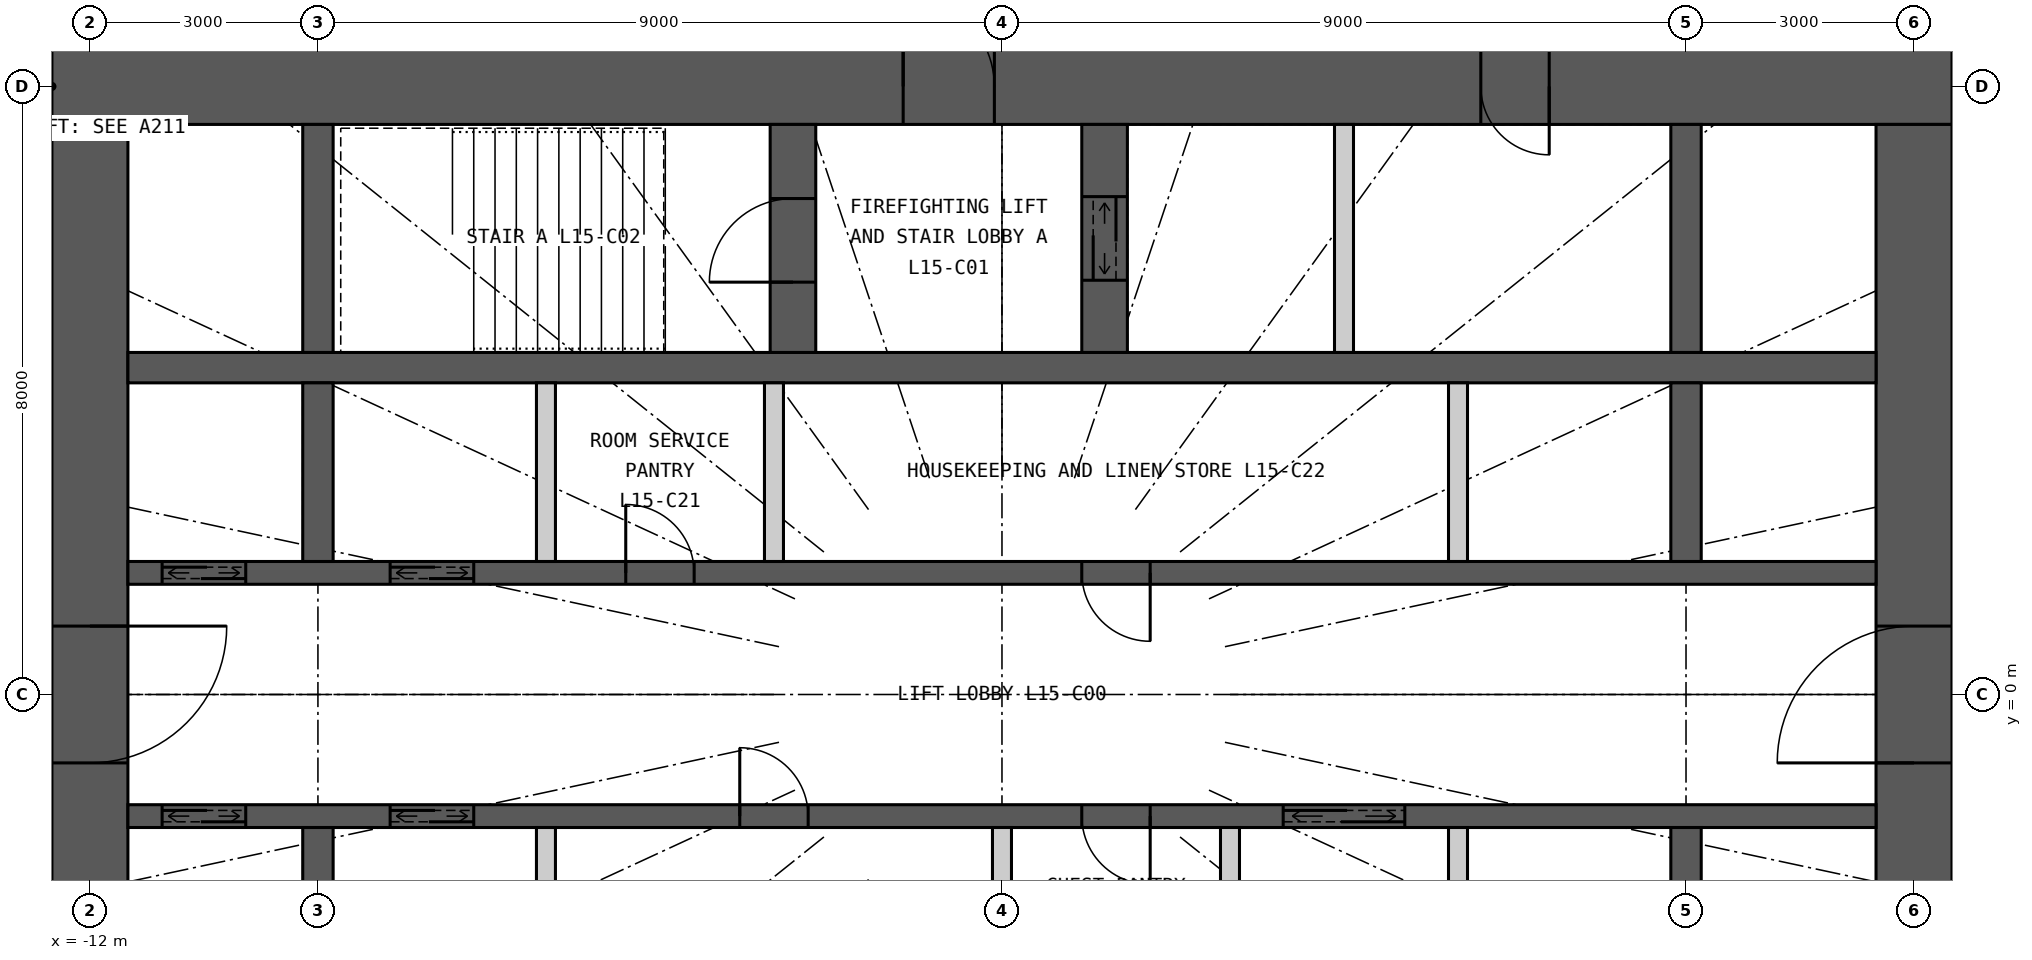
"""IFC4 building model, lengths in metres.
Left out: names, types, materials, properties, quantities, classifications, styles, units other than length and angle.
Written with IfcOpenShell. Run it as: python <this file> out.ifc"""

import sys

from ifc_helpers import new_model, si_unit, direction, frame, frame_2d, origin, place, context, subcontext, project, spatial, rectangle, extrude, element, fill, save


model = new_model("IFC4")
c1 = context("Model", 3, precision=1e-05, world=origin(), true_north=direction((0.0, 1.0)))
c2 = subcontext(c1, "Body", "Model", "MODEL_VIEW")
j1 = project(units=[si_unit("LENGTHUNIT", "METRE"), si_unit("PLANEANGLEUNIT", "RADIAN")], contexts=[c1])
p1 = place(None, origin())
s1 = spatial("IfcSite", under=j1, at=p1, CompositionType="ELEMENT")
p2 = place(p1, origin())
s2 = spatial("IfcBuilding", under=s1, at=p2, CompositionType="ELEMENT")
p3 = place(p2, frame((0.0, 0.0, 63.9)))
s3 = spatial("IfcBuildingStorey", under=s2, at=p3, CompositionType="ELEMENT", Elevation=63.9)
p4 = place(p3, frame((-12.5, 8.0, 0.0), z_axis=(0.0, 0.0, 1.0), x_axis=(1.0, 0.0, 0.0)))
e1 = element("IfcWall", 1, at=p4, inside=s3, PredefinedType="SHEAR", context=c2, shape_type="SweptSolid", body=[
    extrude(rectangle(XDim=25.0, YDim=1.0, at=frame_2d((12.5, 0.0))), origin(), (0.0, 0.0, 1.0), 3.3),
])
p5 = place(p4, frame((11.2, 0.0, 0.0)))
e2 = element("IfcOpeningElement", 2, at=p5, cuts=e1, PredefinedType="OPENING", context=c2, shape_type="SweptSolid", body=[
    extrude(rectangle(XDim=1.2, YDim=2.2, at=frame_2d((0.6, 1.1))), frame((0.0, 0.51, 0.0), z_axis=(0.0, -1.0, 0.0), x_axis=(1.0, 0.0, 0.0)), (0.0, 0.0, 1.0), 1.02),
])
p6 = place(p4, frame((18.8, 0.0, 0.0)))
e3 = element("IfcOpeningElement", 3, at=p6, cuts=e1, PredefinedType="OPENING", context=c2, shape_type="SweptSolid", body=[
    extrude(rectangle(XDim=0.9, YDim=2.2, at=frame_2d((0.45, 1.1))), frame((0.0, 0.51, 0.0), z_axis=(0.0, -1.0, 0.0), x_axis=(1.0, 0.0, 0.0)), (0.0, 0.0, 1.0), 1.02),
])
p7 = place(p3, frame((12.0, -7.5, 0.0), z_axis=(0.0, 0.0, 1.0), x_axis=(0.0, 1.0, 0.0)))
e4 = element("IfcWall", 4, at=p7, inside=s3, PredefinedType="SHEAR", context=c2, shape_type="SweptSolid", body=[
    extrude(rectangle(XDim=15.0, YDim=1.0, at=frame_2d((7.5, 0.0))), origin(), (0.0, 0.0, 1.0), 3.3),
])
p8 = place(p7, frame((6.6, 0.0, 0.0)))
e5 = element("IfcOpeningElement", 5, at=p8, cuts=e4, PredefinedType="OPENING", context=c2, shape_type="SweptSolid", body=[
    extrude(rectangle(XDim=1.8, YDim=2.2, at=frame_2d((0.9, 1.1))), frame((0.0, 0.51, 0.0), z_axis=(0.0, -1.0, 0.0), x_axis=(1.0, 0.0, 0.0)), (0.0, 0.0, 1.0), 1.02),
])
p9 = place(p3, frame((-12.0, 7.5, 0.0), z_axis=(0.0, 0.0, 1.0), x_axis=(0.0, -1.0, 0.0)))
e6 = element("IfcWall", 6, at=p9, inside=s3, PredefinedType="SHEAR", context=c2, shape_type="SweptSolid", body=[
    extrude(rectangle(XDim=15.0, YDim=1.0, at=frame_2d((7.5, 0.0))), origin(), (0.0, 0.0, 1.0), 3.3),
])
p10 = place(p9, frame((6.6, 0.0, 0.0)))
e7 = element("IfcOpeningElement", 7, at=p10, cuts=e6, PredefinedType="OPENING", context=c2, shape_type="SweptSolid", body=[
    extrude(rectangle(XDim=1.8, YDim=2.2, at=frame_2d((0.9, 1.1))), frame((0.0, 0.51, 0.0), z_axis=(0.0, -1.0, 0.0), x_axis=(1.0, 0.0, 0.0)), (0.0, 0.0, 1.0), 1.02),
])
p11 = place(p3, frame((-11.5, 4.3, 0.0), z_axis=(0.0, 0.0, 1.0), x_axis=(1.0, 0.0, 0.0)))
e8 = element("IfcWall", 8, at=p11, inside=s3, PredefinedType="SHEAR", context=c2, shape_type="SweptSolid", body=[
    extrude(rectangle(XDim=23.0, YDim=0.4, at=frame_2d((11.5, 0.0))), origin(), (0.0, 0.0, 1.0), 3.3),
])
p12 = place(p3, frame((-11.5, 1.6, 0.0), z_axis=(0.0, 0.0, 1.0), x_axis=(1.0, 0.0, 0.0)))
e9 = element("IfcWall", 9, at=p12, inside=s3, PredefinedType="SHEAR", context=c2, shape_type="SweptSolid", body=[
    extrude(rectangle(XDim=23.0, YDim=0.3, at=frame_2d((11.5, 0.0))), origin(), (0.0, 0.0, 1.0), 3.3),
])
p13 = place(p12, frame((0.45, 0.0, 0.0)))
e10 = element("IfcOpeningElement", 10, at=p13, cuts=e9, PredefinedType="OPENING", context=c2, shape_type="SweptSolid", body=[
    extrude(rectangle(XDim=1.1, YDim=2.2, at=frame_2d((0.55, 1.1))), frame((0.0, 0.16, 0.0), z_axis=(0.0, -1.0, 0.0), x_axis=(1.0, 0.0, 0.0)), (0.0, 0.0, 1.0), 0.32),
])
p14 = place(p12, frame((3.45, 0.0, 0.0)))
e11 = element("IfcOpeningElement", 11, at=p14, cuts=e9, PredefinedType="OPENING", context=c2, shape_type="SweptSolid", body=[
    extrude(rectangle(XDim=1.1, YDim=2.2, at=frame_2d((0.55, 1.1))), frame((0.0, 0.16, 0.0), z_axis=(0.0, -1.0, 0.0), x_axis=(1.0, 0.0, 0.0)), (0.0, 0.0, 1.0), 0.32),
])
p15 = place(p12, frame((6.55, 0.0, 0.0)))
e12 = element("IfcOpeningElement", 12, at=p15, cuts=e9, PredefinedType="OPENING", context=c2, shape_type="SweptSolid", body=[
    extrude(rectangle(XDim=0.9, YDim=2.2, at=frame_2d((0.45, 1.1))), frame((0.0, 0.16, 0.0), z_axis=(0.0, -1.0, 0.0), x_axis=(1.0, 0.0, 0.0)), (0.0, 0.0, 1.0), 0.32),
])
p16 = place(p12, frame((12.55, 0.0, 0.0)))
e13 = element("IfcOpeningElement", 13, at=p16, cuts=e9, PredefinedType="OPENING", context=c2, shape_type="SweptSolid", body=[
    extrude(rectangle(XDim=0.9, YDim=2.2, at=frame_2d((0.45, 1.1))), frame((0.0, 0.16, 0.0), z_axis=(0.0, -1.0, 0.0), x_axis=(1.0, 0.0, 0.0)), (0.0, 0.0, 1.0), 0.32),
])
p17 = place(p3, frame((-11.5, -1.6, 0.0), z_axis=(0.0, 0.0, 1.0), x_axis=(1.0, 0.0, 0.0)))
e14 = element("IfcWall", 14, at=p17, inside=s3, PredefinedType="SHEAR", context=c2, shape_type="SweptSolid", body=[
    extrude(rectangle(XDim=23.0, YDim=0.3, at=frame_2d((11.5, 0.0))), origin(), (0.0, 0.0, 1.0), 3.3),
])
p18 = place(p17, frame((0.45, 0.0, 0.0)))
e15 = element("IfcOpeningElement", 15, at=p18, cuts=e14, PredefinedType="OPENING", context=c2, shape_type="SweptSolid", body=[
    extrude(rectangle(XDim=1.1, YDim=2.2, at=frame_2d((0.55, 1.1))), frame((0.0, 0.16, 0.0), z_axis=(0.0, -1.0, 0.0), x_axis=(1.0, 0.0, 0.0)), (0.0, 0.0, 1.0), 0.32),
])
p19 = place(p17, frame((3.45, 0.0, 0.0)))
e16 = element("IfcOpeningElement", 16, at=p19, cuts=e14, PredefinedType="OPENING", context=c2, shape_type="SweptSolid", body=[
    extrude(rectangle(XDim=1.1, YDim=2.2, at=frame_2d((0.55, 1.1))), frame((0.0, 0.16, 0.0), z_axis=(0.0, -1.0, 0.0), x_axis=(1.0, 0.0, 0.0)), (0.0, 0.0, 1.0), 0.32),
])
p20 = place(p17, frame((15.2, 0.0, 0.0)))
e17 = element("IfcOpeningElement", 17, at=p20, cuts=e14, PredefinedType="OPENING", context=c2, shape_type="SweptSolid", body=[
    extrude(rectangle(XDim=1.6, YDim=2.4, at=frame_2d((0.8, 1.2))), frame((0.0, 0.16, 0.0), z_axis=(0.0, -1.0, 0.0), x_axis=(1.0, 0.0, 0.0)), (0.0, 0.0, 1.0), 0.32),
])
p21 = place(p17, frame((8.05, 0.0, 0.0)))
e18 = element("IfcOpeningElement", 18, at=p21, cuts=e14, PredefinedType="OPENING", context=c2, shape_type="SweptSolid", body=[
    extrude(rectangle(XDim=0.9, YDim=2.2, at=frame_2d((0.45, 1.1))), frame((0.0, 0.16, 0.0), z_axis=(0.0, -1.0, 0.0), x_axis=(1.0, 0.0, 0.0)), (0.0, 0.0, 1.0), 0.32),
])
p22 = place(p17, frame((12.55, 0.0, 0.0)))
e19 = element("IfcOpeningElement", 19, at=p22, cuts=e14, PredefinedType="OPENING", context=c2, shape_type="SweptSolid", body=[
    extrude(rectangle(XDim=0.9, YDim=2.2, at=frame_2d((0.45, 1.1))), frame((0.0, 0.16, 0.0), z_axis=(0.0, -1.0, 0.0), x_axis=(1.0, 0.0, 0.0)), (0.0, 0.0, 1.0), 0.32),
])
p23 = place(p3, frame((-9.0, 4.5, 0.0), z_axis=(0.0, 0.0, 1.0), x_axis=(0.0, 1.0, 0.0)))
e20 = element("IfcWall", 20, at=p23, inside=s3, PredefinedType="SHEAR", context=c2, shape_type="SweptSolid", body=[
    extrude(rectangle(XDim=3.0, YDim=0.4, at=frame_2d((1.5, 0.0))), origin(), (0.0, 0.0, 1.0), 3.3),
])
for number, where, z_axis, x_axis in (
    (21, (-9.0, 1.75, 0.0), (0.0, 0.0, 1.0), (0.0, 1.0, 0.0)),
    (22, (-9.0, -4.1, 0.0), (0.0, 0.0, 1.0), (0.0, 1.0, 0.0)),
):
    element("IfcWall", number, at=place(p3, frame(where, z_axis=z_axis, x_axis=x_axis)), inside=s3, PredefinedType="SHEAR", context=c2, shape_type="SweptSolid", body=[
        extrude(rectangle(XDim=2.35, YDim=0.4, at=frame_2d((1.175, 0.0))), origin(), (0.0, 0.0, 1.0), 3.3),
    ])
p24 = place(p3, frame((9.0, 4.5, 0.0), z_axis=(0.0, 0.0, 1.0), x_axis=(0.0, 1.0, 0.0)))
e23 = element("IfcWall", 23, at=p24, inside=s3, PredefinedType="SHEAR", context=c2, shape_type="SweptSolid", body=[
    extrude(rectangle(XDim=3.0, YDim=0.4, at=frame_2d((1.5, 0.0))), origin(), (0.0, 0.0, 1.0), 3.3),
])
for number, where, z_axis, x_axis in (
    (24, (9.0, 1.75, 0.0), (0.0, 0.0, 1.0), (0.0, 1.0, 0.0)),
    (25, (9.0, -4.1, 0.0), (0.0, 0.0, 1.0), (0.0, 1.0, 0.0)),
):
    element("IfcWall", number, at=place(p3, frame(where, z_axis=z_axis, x_axis=x_axis)), inside=s3, PredefinedType="SHEAR", context=c2, shape_type="SweptSolid", body=[
        extrude(rectangle(XDim=2.35, YDim=0.4, at=frame_2d((1.175, 0.0))), origin(), (0.0, 0.0, 1.0), 3.3),
    ])
p25 = place(p3, frame((-2.75, 4.5, 0.0), z_axis=(0.0, 0.0, 1.0), x_axis=(0.0, 1.0, 0.0)))
e26 = element("IfcWall", 26, at=p25, inside=s3, PredefinedType="SHEAR", context=c2, shape_type="SweptSolid", body=[
    extrude(rectangle(XDim=3.0, YDim=0.6, at=frame_2d((1.5, 0.0))), origin(), (0.0, 0.0, 1.0), 3.3),
])
p26 = place(p25, frame((0.925, 0.0, 0.0)))
e27 = element("IfcOpeningElement", 27, at=p26, cuts=e26, PredefinedType="OPENING", context=c2, shape_type="SweptSolid", body=[
    extrude(rectangle(XDim=1.1, YDim=2.2, at=frame_2d((0.55, 1.1))), frame((0.0, 0.31, 0.0), z_axis=(0.0, -1.0, 0.0), x_axis=(1.0, 0.0, 0.0)), (0.0, 0.0, 1.0), 0.62),
])
p27 = place(p3, frame((1.35, 4.5, 0.0), z_axis=(0.0, 0.0, 1.0), x_axis=(0.0, 1.0, 0.0)))
e28 = element("IfcWall", 28, at=p27, inside=s3, PredefinedType="SHEAR", context=c2, shape_type="SweptSolid", body=[
    extrude(rectangle(XDim=3.0, YDim=0.6, at=frame_2d((1.5, 0.0))), origin(), (0.0, 0.0, 1.0), 3.3),
])
p28 = place(p27, frame((0.95, 0.0, 0.0)))
e29 = element("IfcOpeningElement", 29, at=p28, cuts=e28, PredefinedType="OPENING", context=c2, shape_type="SweptSolid", body=[
    extrude(rectangle(XDim=1.1, YDim=2.2, at=frame_2d((0.55, 1.1))), frame((0.0, 0.31, 0.0), z_axis=(0.0, -1.0, 0.0), x_axis=(1.0, 0.0, 0.0)), (0.0, 0.0, 1.0), 0.62),
])
p29 = place(p3, frame((4.5, 4.5, 0.0), z_axis=(0.0, 0.0, 1.0), x_axis=(0.0, 1.0, 0.0)))
e30 = element("IfcWall", 30, at=p29, inside=s3, PredefinedType="PARTITIONING", context=c2, shape_type="SweptSolid", body=[
    extrude(rectangle(XDim=3.0, YDim=0.25, at=frame_2d((1.5, 0.0))), origin(), (0.0, 0.0, 1.0), 3.3),
])
for number, where, z_axis, x_axis in (
    (31, (-6.0, 1.75, 0.0), (0.0, 0.0, 1.0), (0.0, 1.0, 0.0)),
    (32, (-3.0, 1.75, 0.0), (0.0, 0.0, 1.0), (0.0, 1.0, 0.0)),
    (33, (6.0, 1.75, 0.0), (0.0, 0.0, 1.0), (0.0, 1.0, 0.0)),
    (34, (-6.0, -4.1, 0.0), (0.0, 0.0, 1.0), (0.0, 1.0, 0.0)),
    (35, (0.0, -4.1, 0.0), (0.0, 0.0, 1.0), (0.0, 1.0, 0.0)),
    (36, (3.0, -4.1, 0.0), (0.0, 0.0, 1.0), (0.0, 1.0, 0.0)),
    (37, (6.0, -4.1, 0.0), (0.0, 0.0, 1.0), (0.0, 1.0, 0.0)),
):
    element("IfcWall", number, at=place(p3, frame(where, z_axis=z_axis, x_axis=x_axis)), inside=s3, PredefinedType="PARTITIONING", context=c2, shape_type="SweptSolid", body=[
        extrude(rectangle(XDim=2.35, YDim=0.25, at=frame_2d((1.175, 0.0))), origin(), (0.0, 0.0, 1.0), 3.3),
    ])
p30 = place(p5, origin())
e38 = element("IfcDoor", 38, at=p30, inside=s3, OperationType="SINGLE_SWING_LEFT", PredefinedType="DOOR", context=c2, shape_type="SweptSolid", body=[
    extrude(rectangle(XDim=1.2, YDim=2.2, at=frame_2d((0.6, 1.1))), frame((0.0, 0.025, 0.0), z_axis=(0.0, -1.0, 0.0), x_axis=(1.0, 0.0, 0.0)), (0.0, 0.0, 1.0), 0.05),
])
fill(e2, e38)
p31 = place(p26, origin())
e39 = element("IfcDoor", 39, at=p31, inside=s3, OperationType="SINGLE_SWING_LEFT", PredefinedType="DOOR", context=c2, shape_type="SweptSolid", body=[
    extrude(rectangle(XDim=1.1, YDim=2.2, at=frame_2d((0.55, 1.1))), frame((0.0, 0.025, 0.0), z_axis=(0.0, -1.0, 0.0), x_axis=(1.0, 0.0, 0.0)), (0.0, 0.0, 1.0), 0.05),
])
fill(e27, e39)
p32 = place(p28, origin())
e40 = element("IfcDoor", 40, at=p32, inside=s3, OperationType="DOUBLE_DOOR_SLIDING", PredefinedType="DOOR", context=c2, shape_type="SweptSolid", body=[
    extrude(rectangle(XDim=1.1, YDim=2.2, at=frame_2d((0.55, 1.1))), frame((0.0, 0.025, 0.0), z_axis=(0.0, -1.0, 0.0), x_axis=(1.0, 0.0, 0.0)), (0.0, 0.0, 1.0), 0.05),
])
fill(e29, e40)
p33 = place(p6, origin())
e41 = element("IfcDoor", 41, at=p33, inside=s3, OperationType="SINGLE_SWING_RIGHT", PredefinedType="DOOR", context=c2, shape_type="SweptSolid", body=[
    extrude(rectangle(XDim=0.9, YDim=2.2, at=frame_2d((0.45, 1.1))), frame((0.0, 0.025, 0.0), z_axis=(0.0, -1.0, 0.0), x_axis=(1.0, 0.0, 0.0)), (0.0, 0.0, 1.0), 0.05),
])
fill(e3, e41)
p34 = place(p13, origin())
e42 = element("IfcDoor", 42, at=p34, inside=s3, OperationType="DOUBLE_DOOR_SLIDING", PredefinedType="DOOR", context=c2, shape_type="SweptSolid", body=[
    extrude(rectangle(XDim=1.1, YDim=2.2, at=frame_2d((0.55, 1.1))), frame((0.0, 0.025, 0.0), z_axis=(0.0, -1.0, 0.0), x_axis=(1.0, 0.0, 0.0)), (0.0, 0.0, 1.0), 0.05),
])
fill(e10, e42)
p35 = place(p14, origin())
e43 = element("IfcDoor", 43, at=p35, inside=s3, OperationType="DOUBLE_DOOR_SLIDING", PredefinedType="DOOR", context=c2, shape_type="SweptSolid", body=[
    extrude(rectangle(XDim=1.1, YDim=2.2, at=frame_2d((0.55, 1.1))), frame((0.0, 0.025, 0.0), z_axis=(0.0, -1.0, 0.0), x_axis=(1.0, 0.0, 0.0)), (0.0, 0.0, 1.0), 0.05),
])
fill(e11, e43)
p36 = place(p18, origin())
e44 = element("IfcDoor", 44, at=p36, inside=s3, OperationType="DOUBLE_DOOR_SLIDING", PredefinedType="DOOR", context=c2, shape_type="SweptSolid", body=[
    extrude(rectangle(XDim=1.1, YDim=2.2, at=frame_2d((0.55, 1.1))), frame((0.0, 0.025, 0.0), z_axis=(0.0, -1.0, 0.0), x_axis=(1.0, 0.0, 0.0)), (0.0, 0.0, 1.0), 0.05),
])
fill(e15, e44)
p37 = place(p19, origin())
e45 = element("IfcDoor", 45, at=p37, inside=s3, OperationType="DOUBLE_DOOR_SLIDING", PredefinedType="DOOR", context=c2, shape_type="SweptSolid", body=[
    extrude(rectangle(XDim=1.1, YDim=2.2, at=frame_2d((0.55, 1.1))), frame((0.0, 0.025, 0.0), z_axis=(0.0, -1.0, 0.0), x_axis=(1.0, 0.0, 0.0)), (0.0, 0.0, 1.0), 0.05),
])
fill(e16, e45)
p38 = place(p20, origin())
e46 = element("IfcDoor", 46, at=p38, inside=s3, OperationType="DOUBLE_DOOR_SLIDING", PredefinedType="DOOR", context=c2, shape_type="SweptSolid", body=[
    extrude(rectangle(XDim=1.6, YDim=2.4, at=frame_2d((0.8, 1.2))), frame((0.0, 0.025, 0.0), z_axis=(0.0, -1.0, 0.0), x_axis=(1.0, 0.0, 0.0)), (0.0, 0.0, 1.0), 0.05),
])
fill(e17, e46)
p39 = place(p15, origin())
e47 = element("IfcDoor", 47, at=p39, inside=s3, OperationType="SINGLE_SWING_LEFT", PredefinedType="DOOR", context=c2, shape_type="SweptSolid", body=[
    extrude(rectangle(XDim=0.9, YDim=2.2, at=frame_2d((0.45, 1.1))), frame((0.0, 0.025, 0.0), z_axis=(0.0, -1.0, 0.0), x_axis=(1.0, 0.0, 0.0)), (0.0, 0.0, 1.0), 0.05),
])
fill(e12, e47)
p40 = place(p16, origin())
e48 = element("IfcDoor", 48, at=p40, inside=s3, OperationType="SINGLE_SWING_RIGHT", PredefinedType="DOOR", context=c2, shape_type="SweptSolid", body=[
    extrude(rectangle(XDim=0.9, YDim=2.2, at=frame_2d((0.45, 1.1))), frame((0.0, 0.025, 0.0), z_axis=(0.0, -1.0, 0.0), x_axis=(1.0, 0.0, 0.0)), (0.0, 0.0, 1.0), 0.05),
])
fill(e13, e48)
p41 = place(p21, origin())
e49 = element("IfcDoor", 49, at=p41, inside=s3, OperationType="SINGLE_SWING_LEFT", PredefinedType="DOOR", context=c2, shape_type="SweptSolid", body=[
    extrude(rectangle(XDim=0.9, YDim=2.2, at=frame_2d((0.45, 1.1))), frame((0.0, 0.025, 0.0), z_axis=(0.0, -1.0, 0.0), x_axis=(1.0, 0.0, 0.0)), (0.0, 0.0, 1.0), 0.05),
])
fill(e18, e49)
p42 = place(p22, origin())
e50 = element("IfcDoor", 50, at=p42, inside=s3, OperationType="SINGLE_SWING_RIGHT", PredefinedType="DOOR", context=c2, shape_type="SweptSolid", body=[
    extrude(rectangle(XDim=0.9, YDim=2.2, at=frame_2d((0.45, 1.1))), frame((0.0, 0.025, 0.0), z_axis=(0.0, -1.0, 0.0), x_axis=(1.0, 0.0, 0.0)), (0.0, 0.0, 1.0), 0.05),
])
fill(e19, e50)
p43 = place(p8, origin())
e51 = element("IfcDoor", 51, at=p43, inside=s3, OperationType="DOUBLE_DOOR_DOUBLE_SWING", PredefinedType="DOOR", context=c2, shape_type="SweptSolid", body=[
    extrude(rectangle(XDim=1.8, YDim=2.2, at=frame_2d((0.9, 1.1))), frame((0.0, 0.025, 0.0), z_axis=(0.0, -1.0, 0.0), x_axis=(1.0, 0.0, 0.0)), (0.0, 0.0, 1.0), 0.05),
])
fill(e5, e51)
p44 = place(p10, origin())
e52 = element("IfcDoor", 52, at=p44, inside=s3, OperationType="DOUBLE_DOOR_DOUBLE_SWING", PredefinedType="DOOR", context=c2, shape_type="SweptSolid", body=[
    extrude(rectangle(XDim=1.8, YDim=2.2, at=frame_2d((0.9, 1.1))), frame((0.0, 0.025, 0.0), z_axis=(0.0, -1.0, 0.0), x_axis=(1.0, 0.0, 0.0)), (0.0, 0.0, 1.0), 0.05),
])
fill(e7, e52)
save(model, sys.argv[1])
